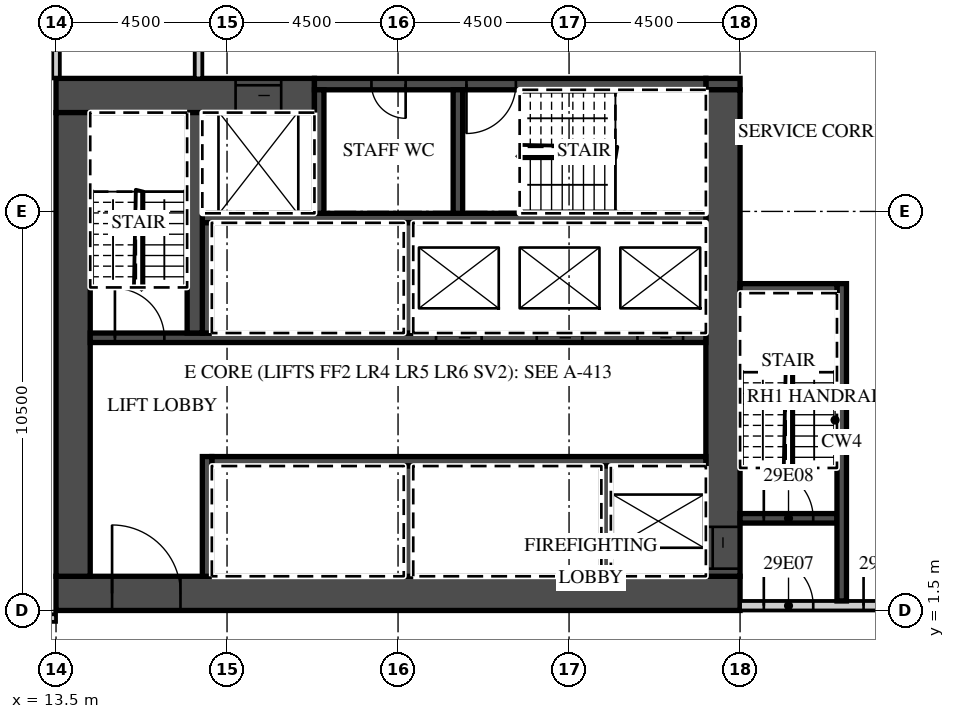
"""IFC4 building model, lengths in metres.
Left out: names, types, materials, properties, quantities, classifications, styles, units other than length and angle.
Written with IfcOpenShell. Run it as: python <this file> out.ifc"""

import sys

from ifc_helpers import new_model, si_unit, direction, frame, frame_2d, origin, place, context, subcontext, project, spatial, rectangle, extrude, element, fill, save


model = new_model("IFC4")
c1 = context("Model", 3, precision=1e-05, world=origin(), true_north=direction((0.0, 1.0)))
c2 = subcontext(c1, "Body", "Model", "MODEL_VIEW")
j1 = project(units=[si_unit("LENGTHUNIT", "METRE"), si_unit("PLANEANGLEUNIT", "RADIAN")], contexts=[c1])
p1 = place(None, origin())
s1 = spatial("IfcSite", under=j1, at=p1, CompositionType="ELEMENT")
p2 = place(p1, origin())
s2 = spatial("IfcBuilding", under=s1, at=p2, CompositionType="ELEMENT")
p3 = place(p2, frame((0.0, 0.0, 130.6)))
s3 = spatial("IfcBuildingStorey", under=s2, at=p3, CompositionType="ELEMENT", Elevation=130.6)
p4 = place(p3, frame((13.5, 15.5, 0.0), z_axis=(0.0, 0.0, 1.0), x_axis=(0.0, 1.0, 0.0)))
e1 = element("IfcWall", 1, at=p4, inside=s3, PredefinedType="PARTITIONING", context=c2, shape_type="SweptSolid", body=[
    extrude(rectangle(XDim=7.162, YDim=0.2, at=frame_2d((3.581, 0.0))), origin(), (0.0, 0.0, 1.0), 3.02),
])
p5 = place(p3, frame((-39.316, 1.3, 0.0), z_axis=(0.0, 0.0, 1.0), x_axis=(1.0, 0.0, 0.0)))
e2 = element("IfcWall", 2, at=p5, inside=s3, PredefinedType="PARTITIONING", context=c2, shape_type="SweptSolid", body=[
    extrude(rectangle(XDim=52.816, YDim=0.2, at=frame_2d((26.408, 0.0))), origin(), (0.0, 0.0, 1.0), 3.02),
])
p6 = place(p5, frame((0.15, 0.0, 0.0)))
e3 = element("IfcOpeningElement", 3, at=p6, cuts=e2, PredefinedType="OPENING", context=c2, shape_type="SweptSolid", body=[
    extrude(rectangle(XDim=0.9, YDim=2.1, at=frame_2d((0.45, 1.05))), frame((0.0, 0.11, 0.0), z_axis=(0.0, -1.0, 0.0), x_axis=(1.0, 0.0, 0.0)), (0.0, 0.0, 1.0), 0.22),
])
p7 = place(p5, frame((8.679, 0.0, 0.0)))
e4 = element("IfcOpeningElement", 4, at=p7, cuts=e2, PredefinedType="OPENING", context=c2, shape_type="SweptSolid", body=[
    extrude(rectangle(XDim=1.2, YDim=2.1, at=frame_2d((0.6, 1.05))), frame((0.0, 0.11, 0.0), z_axis=(0.0, -1.0, 0.0), x_axis=(1.0, 0.0, 0.0)), (0.0, 0.0, 1.0), 0.22),
])
p8 = place(p5, frame((14.754, 0.0, 0.0)))
e5 = element("IfcOpeningElement", 5, at=p8, cuts=e2, PredefinedType="OPENING", context=c2, shape_type="SweptSolid", body=[
    extrude(rectangle(XDim=1.2, YDim=2.1, at=frame_2d((0.6, 1.05))), frame((0.0, 0.11, 0.0), z_axis=(0.0, -1.0, 0.0), x_axis=(1.0, 0.0, 0.0)), (0.0, 0.0, 1.0), 0.22),
])
p9 = place(p5, frame((26.678, 0.0, 0.0)))
e6 = element("IfcOpeningElement", 6, at=p9, cuts=e2, PredefinedType="OPENING", context=c2, shape_type="SweptSolid", body=[
    extrude(rectangle(XDim=1.2, YDim=2.1, at=frame_2d((0.6, 1.05))), frame((0.0, 0.11, 0.0), z_axis=(0.0, -1.0, 0.0), x_axis=(1.0, 0.0, 0.0)), (0.0, 0.0, 1.0), 0.22),
])
p10 = place(p5, frame((33.266, 0.0, 0.0)))
e7 = element("IfcOpeningElement", 7, at=p10, cuts=e2, PredefinedType="OPENING", context=c2, shape_type="SweptSolid", body=[
    extrude(rectangle(XDim=1.0, YDim=2.1, at=frame_2d((0.5, 1.05))), frame((0.0, 0.11, 0.0), z_axis=(0.0, -1.0, 0.0), x_axis=(1.0, 0.0, 0.0)), (0.0, 0.0, 1.0), 0.22),
])
p11 = place(p5, frame((37.741, 0.0, 0.0)))
e8 = element("IfcOpeningElement", 8, at=p11, cuts=e2, PredefinedType="OPENING", context=c2, shape_type="SweptSolid", body=[
    extrude(rectangle(XDim=1.0, YDim=2.1, at=frame_2d((0.5, 1.05))), frame((0.0, 0.11, 0.0), z_axis=(0.0, -1.0, 0.0), x_axis=(1.0, 0.0, 0.0)), (0.0, 0.0, 1.0), 0.22),
])
p12 = place(p5, frame((41.754, 0.0, 0.0)))
e9 = element("IfcOpeningElement", 9, at=p12, cuts=e2, PredefinedType="OPENING", context=c2, shape_type="SweptSolid", body=[
    extrude(rectangle(XDim=1.2, YDim=2.1, at=frame_2d((0.6, 1.05))), frame((0.0, 0.11, 0.0), z_axis=(0.0, -1.0, 0.0), x_axis=(1.0, 0.0, 0.0)), (0.0, 0.0, 1.0), 0.22),
])
p13 = place(p5, frame((51.241, 0.0, 0.0)))
e10 = element("IfcOpeningElement", 10, at=p13, cuts=e2, PredefinedType="OPENING", context=c2, shape_type="SweptSolid", body=[
    extrude(rectangle(XDim=1.0, YDim=2.1, at=frame_2d((0.5, 1.05))), frame((0.0, 0.11, 0.0), z_axis=(0.0, -1.0, 0.0), x_axis=(1.0, 0.0, 0.0)), (0.0, 0.0, 1.0), 0.22),
])
p14 = place(p3, frame((13.5, 1.95, 0.0), z_axis=(0.0, 0.0, 1.0), x_axis=(1.0, 0.0, 0.0)))
e11 = element("IfcWall", 11, at=p14, inside=s3, PredefinedType="SHEAR", context=c2, shape_type="SweptSolid", body=[
    extrude(rectangle(XDim=18.0, YDim=0.9, at=frame_2d((9.0, 0.0))), origin(), (0.0, 0.0, 1.0), 3.02),
])
p15 = place(p14, frame((1.475, 0.0, 0.0)))
e12 = element("IfcOpeningElement", 12, at=p15, cuts=e11, PredefinedType="OPENING", context=c2, shape_type="SweptSolid", body=[
    extrude(rectangle(XDim=1.8, YDim=2.1, at=frame_2d((0.9, 1.05))), frame((0.0, 0.46, 0.0), z_axis=(0.0, -1.0, 0.0), x_axis=(1.0, 0.0, 0.0)), (0.0, 0.0, 1.0), 0.92),
])
p16 = place(p3, frame((13.5, 15.05, 0.0), z_axis=(0.0, 0.0, 1.0), x_axis=(1.0, 0.0, 0.0)))
e13 = element("IfcWall", 13, at=p16, inside=s3, PredefinedType="SHEAR", context=c2, shape_type="SweptSolid", body=[
    extrude(rectangle(XDim=6.8, YDim=0.9, at=frame_2d((3.4, 0.0))), origin(), (0.0, 0.0, 1.0), 3.02),
])
p17 = place(p16, frame((4.725, 0.0, 0.0)))
e14 = element("IfcOpeningElement", 14, at=p17, cuts=e13, PredefinedType="OPENING", context=c2, shape_type="SweptSolid", body=[
    extrude(rectangle(XDim=1.2, YDim=2.1, at=frame_2d((0.6, 1.05))), frame((0.0, 0.46, 0.0), z_axis=(0.0, -1.0, 0.0), x_axis=(1.0, 0.0, 0.0)), (0.0, 0.0, 1.0), 0.92),
])
p18 = place(p3, frame((30.6, 15.35, 0.0), z_axis=(0.0, 0.0, 1.0), x_axis=(1.0, 0.0, 0.0)))
e15 = element("IfcWall", 15, at=p18, inside=s3, PredefinedType="SHEAR", context=c2, shape_type="SweptSolid", body=[
    extrude(rectangle(XDim=0.9, YDim=0.3, at=frame_2d((0.45, 0.0))), origin(), (0.0, 0.0, 1.0), 3.02),
])
p19 = place(p3, frame((20.3, 15.35, 0.0), z_axis=(0.0, 0.0, 1.0), x_axis=(1.0, 0.0, 0.0)))
e16 = element("IfcWall", 16, at=p19, inside=s3, PredefinedType="SHEAR", context=c2, shape_type="SweptSolid", body=[
    extrude(rectangle(XDim=10.3, YDim=0.3, at=frame_2d((5.15, 0.0))), origin(), (0.0, 0.0, 1.0), 3.02),
])
p20 = place(p19, frame((4.0, 0.0, 0.0)))
e17 = element("IfcOpeningElement", 17, at=p20, cuts=e16, PredefinedType="OPENING", context=c2, shape_type="SweptSolid", body=[
    extrude(rectangle(XDim=1.3, YDim=2.1, at=frame_2d((0.65, 1.05))), frame((0.0, 0.16, 0.0), z_axis=(0.0, -1.0, 0.0), x_axis=(1.0, 0.0, 0.0)), (0.0, 0.0, 1.0), 0.32),
])
p21 = place(p19, frame((1.5, 0.0, 0.0)))
e18 = element("IfcOpeningElement", 18, at=p21, cuts=e16, PredefinedType="OPENING", context=c2, shape_type="SweptSolid", body=[
    extrude(rectangle(XDim=0.9, YDim=2.1, at=frame_2d((0.45, 1.05))), frame((0.0, 0.16, 0.0), z_axis=(0.0, -1.0, 0.0), x_axis=(1.0, 0.0, 0.0)), (0.0, 0.0, 1.0), 0.32),
])
p22 = place(p3, frame((31.05, 2.4, 0.0), z_axis=(0.0, 0.0, 1.0), x_axis=(0.0, 1.0, 0.0)))
e19 = element("IfcWall", 19, at=p22, inside=s3, PredefinedType="SHEAR", context=c2, shape_type="SweptSolid", body=[
    extrude(rectangle(XDim=12.8, YDim=0.9, at=frame_2d((6.4, 0.0))), origin(), (0.0, 0.0, 1.0), 3.02),
])
p23 = place(p22, frame((0.2, 0.0, 0.0)))
e20 = element("IfcOpeningElement", 20, at=p23, cuts=e19, PredefinedType="OPENING", context=c2, shape_type="SweptSolid", body=[
    extrude(rectangle(XDim=1.1, YDim=2.1, at=frame_2d((0.55, 1.05))), frame((0.0, 0.46, 0.0), z_axis=(0.0, -1.0, 0.0), x_axis=(1.0, 0.0, 0.0)), (0.0, 0.0, 1.0), 0.92),
])
p24 = place(p3, frame((13.95, 2.4, 0.0), z_axis=(0.0, 0.0, 1.0), x_axis=(0.0, 1.0, 0.0)))
e21 = element("IfcWall", 21, at=p24, inside=s3, PredefinedType="SHEAR", context=c2, shape_type="SweptSolid", body=[
    extrude(rectangle(XDim=12.2, YDim=0.9, at=frame_2d((6.1, 0.0))), origin(), (0.0, 0.0, 1.0), 3.02),
])
p25 = place(p3, frame((17.6, 5.425, 0.0), z_axis=(0.0, 0.0, 1.0), x_axis=(1.0, 0.0, 0.0)))
e22 = element("IfcWall", 22, at=p25, inside=s3, PredefinedType="SHEAR", context=c2, shape_type="SweptSolid", body=[
    extrude(rectangle(XDim=13.0, YDim=0.25, at=frame_2d((6.5, 0.0))), origin(), (0.0, 0.0, 1.0), 3.02),
])
p26 = place(p3, frame((17.475, 2.4, 0.0), z_axis=(0.0, 0.0, 1.0), x_axis=(0.0, 1.0, 0.0)))
e23 = element("IfcWall", 23, at=p26, inside=s3, PredefinedType="SHEAR", context=c2, shape_type="SweptSolid", body=[
    extrude(rectangle(XDim=3.15, YDim=0.25, at=frame_2d((1.575, 0.0))), origin(), (0.0, 0.0, 1.0), 3.02),
])
for number, where, z_axis, x_axis in (
    (24, (27.975, 2.4, 0.0), (0.0, 0.0, 1.0), (0.0, 1.0, 0.0)),
    (25, (22.775, 2.4, 0.0), (0.0, 0.0, 1.0), (0.0, 1.0, 0.0)),
):
    element("IfcWall", number, at=place(p3, frame(where, z_axis=z_axis, x_axis=x_axis)), inside=s3, PredefinedType="SHEAR", context=c2, shape_type="SweptSolid", body=[
        extrude(rectangle(XDim=2.9, YDim=0.25, at=frame_2d((1.45, 0.0))), origin(), (0.0, 0.0, 1.0), 3.02),
    ])
p27 = place(p3, frame((14.4, 8.675, 0.0), z_axis=(0.0, 0.0, 1.0), x_axis=(1.0, 0.0, 0.0)))
e26 = element("IfcWall", 26, at=p27, inside=s3, PredefinedType="SHEAR", context=c2, shape_type="SweptSolid", body=[
    extrude(rectangle(XDim=16.2, YDim=0.25, at=frame_2d((8.1, 0.0))), origin(), (0.0, 0.0, 1.0), 3.02),
])
p28 = place(p27, frame((14.4, 0.0, 0.0)))
e27 = element("IfcOpeningElement", 27, at=p28, cuts=e26, PredefinedType="OPENING", context=c2, shape_type="SweptSolid", body=[
    extrude(rectangle(XDim=1.2, YDim=2.1, at=frame_2d((0.6, 1.05))), frame((0.0, 0.135, 0.0), z_axis=(0.0, -1.0, 0.0), x_axis=(1.0, 0.0, 0.0)), (0.0, 0.0, 1.0), 0.27),
])
p29 = place(p27, frame((11.75, 0.0, 0.0)))
e28 = element("IfcOpeningElement", 28, at=p29, cuts=e26, PredefinedType="OPENING", context=c2, shape_type="SweptSolid", body=[
    extrude(rectangle(XDim=1.2, YDim=2.1, at=frame_2d((0.6, 1.05))), frame((0.0, 0.135, 0.0), z_axis=(0.0, -1.0, 0.0), x_axis=(1.0, 0.0, 0.0)), (0.0, 0.0, 1.0), 0.27),
])
p30 = place(p27, frame((9.1, 0.0, 0.0)))
e29 = element("IfcOpeningElement", 29, at=p30, cuts=e26, PredefinedType="OPENING", context=c2, shape_type="SweptSolid", body=[
    extrude(rectangle(XDim=1.2, YDim=2.1, at=frame_2d((0.6, 1.05))), frame((0.0, 0.135, 0.0), z_axis=(0.0, -1.0, 0.0), x_axis=(1.0, 0.0, 0.0)), (0.0, 0.0, 1.0), 0.27),
])
p31 = place(p27, frame((0.65, 0.0, 0.0)))
e30 = element("IfcOpeningElement", 30, at=p31, cuts=e26, PredefinedType="OPENING", context=c2, shape_type="SweptSolid", body=[
    extrude(rectangle(XDim=1.3, YDim=2.1, at=frame_2d((0.65, 1.05))), frame((0.0, 0.135, 0.0), z_axis=(0.0, -1.0, 0.0), x_axis=(1.0, 0.0, 0.0)), (0.0, 0.0, 1.0), 0.27),
])
p32 = place(p3, frame((17.35, 11.825, 0.0), z_axis=(0.0, 0.0, 1.0), x_axis=(1.0, 0.0, 0.0)))
e31 = element("IfcWall", 31, at=p32, inside=s3, PredefinedType="SHEAR", context=c2, shape_type="SweptSolid", body=[
    extrude(rectangle(XDim=13.25, YDim=0.25, at=frame_2d((6.625, 0.0))), origin(), (0.0, 0.0, 1.0), 3.02),
])
for number, where, z_axis, x_axis in (
    (32, (17.475, 8.8, 0.0), (0.0, 0.0, 1.0), (0.0, 1.0, 0.0)),
    (33, (22.775, 8.8, 0.0), (0.0, 0.0, 1.0), (0.0, 1.0, 0.0)),
):
    element("IfcWall", number, at=place(p3, frame(where, z_axis=z_axis, x_axis=x_axis)), inside=s3, PredefinedType="SHEAR", context=c2, shape_type="SweptSolid", body=[
        extrude(rectangle(XDim=2.9, YDim=0.25, at=frame_2d((1.45, 0.0))), origin(), (0.0, 0.0, 1.0), 3.02),
    ])
p33 = place(p3, frame((17.15, 8.8, 0.0), z_axis=(0.0, 0.0, 1.0), x_axis=(0.0, 1.0, 0.0)))
e34 = element("IfcWall", 34, at=p33, inside=s3, PredefinedType="SHEAR", context=c2, shape_type="SweptSolid", body=[
    extrude(rectangle(XDim=5.8, YDim=0.4, at=frame_2d((2.9, 0.0))), origin(), (0.0, 0.0, 1.0), 3.02),
])
for number, where, z_axis, x_axis in (
    (35, (20.425, 11.95, 0.0), (0.0, 0.0, 1.0), (0.0, 1.0, 0.0)),
    (36, (24.075, 11.95, 0.0), (0.0, 0.0, 1.0), (0.0, 1.0, 0.0)),
):
    element("IfcWall", number, at=place(p3, frame(where, z_axis=z_axis, x_axis=x_axis)), inside=s3, PredefinedType="SHEAR", context=c2, shape_type="SweptSolid", body=[
        extrude(rectangle(XDim=3.25, YDim=0.25, at=frame_2d((1.625, 0.0))), origin(), (0.0, 0.0, 1.0), 3.02),
    ])
p34 = place(p3, frame((31.5, 1.625, 0.0), z_axis=(0.0, 0.0, 1.0), x_axis=(1.0, 0.0, 0.0)))
e37 = element("IfcWall", 37, at=p34, inside=s3, PredefinedType="PARTITIONING", context=c2, shape_type="SweptSolid", body=[
    extrude(rectangle(XDim=15.65, YDim=0.25, at=frame_2d((7.825, 0.0))), origin(), (0.0, 0.0, 1.0), 3.02),
])
p35 = place(p34, frame((0.625, 0.0, 0.0)))
e38 = element("IfcOpeningElement", 38, at=p35, cuts=e37, PredefinedType="OPENING", context=c2, shape_type="SweptSolid", body=[
    extrude(rectangle(XDim=1.3, YDim=2.1, at=frame_2d((0.65, 1.05))), frame((0.0, 0.135, 0.0), z_axis=(0.0, -1.0, 0.0), x_axis=(1.0, 0.0, 0.0)), (0.0, 0.0, 1.0), 0.27),
])
p36 = place(p34, frame((3.25, 0.0, 0.0)))
e39 = element("IfcOpeningElement", 39, at=p36, cuts=e37, PredefinedType="OPENING", context=c2, shape_type="SweptSolid", body=[
    extrude(rectangle(XDim=1.1, YDim=2.1, at=frame_2d((0.55, 1.05))), frame((0.0, 0.135, 0.0), z_axis=(0.0, -1.0, 0.0), x_axis=(1.0, 0.0, 0.0)), (0.0, 0.0, 1.0), 0.27),
])
p37 = place(p3, frame((31.5, 3.925, 0.0), z_axis=(0.0, 0.0, 1.0), x_axis=(1.0, 0.0, 0.0)))
e40 = element("IfcWall", 40, at=p37, inside=s3, PredefinedType="SHEAR", context=c2, shape_type="SweptSolid", body=[
    extrude(rectangle(XDim=2.55, YDim=0.25, at=frame_2d((1.275, 0.0))), origin(), (0.0, 0.0, 1.0), 3.02),
])
p38 = place(p37, frame((0.625, 0.0, 0.0)))
e41 = element("IfcOpeningElement", 41, at=p38, cuts=e40, PredefinedType="OPENING", context=c2, shape_type="SweptSolid", body=[
    extrude(rectangle(XDim=1.3, YDim=2.1, at=frame_2d((0.65, 1.05))), frame((0.0, 0.135, 0.0), z_axis=(0.0, -1.0, 0.0), x_axis=(1.0, 0.0, 0.0)), (0.0, 0.0, 1.0), 0.27),
])
p39 = place(p3, frame((34.175, 1.75, 0.0), z_axis=(0.0, 0.0, 1.0), x_axis=(0.0, 1.0, 0.0)))
e42 = element("IfcWall", 42, at=p39, inside=s3, PredefinedType="SHEAR", context=c2, shape_type="SweptSolid", body=[
    extrude(rectangle(XDim=8.35, YDim=0.25, at=frame_2d((4.175, 0.0))), origin(), (0.0, 0.0, 1.0), 3.02),
])
p40 = place(p3, frame((31.5, 9.975, 0.0), z_axis=(0.0, 0.0, 1.0), x_axis=(1.0, 0.0, 0.0)))
e43 = element("IfcWall", 43, at=p40, inside=s3, PredefinedType="SHEAR", context=c2, shape_type="SweptSolid", body=[
    extrude(rectangle(XDim=2.55, YDim=0.25, at=frame_2d((1.275, 0.0))), origin(), (0.0, 0.0, 1.0), 3.02),
])
p41 = place(p3, frame((17.25, 15.5, 0.0), z_axis=(0.0, 0.0, 1.0), x_axis=(0.0, 1.0, 0.0)))
e44 = element("IfcWall", 44, at=p41, inside=s3, PredefinedType="PARTITIONING", context=c2, shape_type="SweptSolid", body=[
    extrude(rectangle(XDim=2.2, YDim=0.2, at=frame_2d((1.1, 0.0))), origin(), (0.0, 0.0, 1.0), 3.02),
])
p42 = place(p28, origin())
e45 = element("IfcDoor", 45, at=p42, inside=s3, OperationType="SLIDING_TO_LEFT", PredefinedType="DOOR", context=c2, shape_type="SweptSolid", body=[
    extrude(rectangle(XDim=1.2, YDim=2.1, at=frame_2d((0.6, 1.05))), frame((0.0, 0.025, 0.0), z_axis=(0.0, -1.0, 0.0), x_axis=(1.0, 0.0, 0.0)), (0.0, 0.0, 1.0), 0.05),
])
fill(e27, e45)
p43 = place(p29, origin())
e46 = element("IfcDoor", 46, at=p43, inside=s3, OperationType="SLIDING_TO_RIGHT", PredefinedType="DOOR", context=c2, shape_type="SweptSolid", body=[
    extrude(rectangle(XDim=1.2, YDim=2.1, at=frame_2d((0.6, 1.05))), frame((0.0, 0.025, 0.0), z_axis=(0.0, -1.0, 0.0), x_axis=(1.0, 0.0, 0.0)), (0.0, 0.0, 1.0), 0.05),
])
fill(e28, e46)
p44 = place(p30, origin())
e47 = element("IfcDoor", 47, at=p44, inside=s3, OperationType="SLIDING_TO_RIGHT", PredefinedType="DOOR", context=c2, shape_type="SweptSolid", body=[
    extrude(rectangle(XDim=1.2, YDim=2.1, at=frame_2d((0.6, 1.05))), frame((0.0, 0.025, 0.0), z_axis=(0.0, -1.0, 0.0), x_axis=(1.0, 0.0, 0.0)), (0.0, 0.0, 1.0), 0.05),
])
fill(e29, e47)
p45 = place(p17, origin())
e48 = element("IfcDoor", 48, at=p45, inside=s3, OperationType="SLIDING_TO_LEFT", PredefinedType="DOOR", context=c2, shape_type="SweptSolid", body=[
    extrude(rectangle(XDim=1.2, YDim=2.1, at=frame_2d((0.6, 1.05))), frame((0.0, 0.025, 0.0), z_axis=(0.0, -1.0, 0.0), x_axis=(1.0, 0.0, 0.0)), (0.0, 0.0, 1.0), 0.05),
])
fill(e14, e48)
p46 = place(p23, origin())
e49 = element("IfcDoor", 49, at=p46, inside=s3, OperationType="SLIDING_TO_LEFT", PredefinedType="DOOR", context=c2, shape_type="SweptSolid", body=[
    extrude(rectangle(XDim=1.1, YDim=2.1, at=frame_2d((0.55, 1.05))), frame((0.0, 0.025, 0.0), z_axis=(0.0, -1.0, 0.0), x_axis=(1.0, 0.0, 0.0)), (0.0, 0.0, 1.0), 0.05),
])
fill(e20, e49)
p47 = place(p15, origin())
e50 = element("IfcDoor", 50, at=p47, inside=s3, OperationType="DOUBLE_DOOR_DOUBLE_SWING", PredefinedType="DOOR", context=c2, shape_type="SweptSolid", body=[
    extrude(rectangle(XDim=1.8, YDim=2.1, at=frame_2d((0.9, 1.05))), frame((0.0, 0.025, 0.0), z_axis=(0.0, -1.0, 0.0), x_axis=(1.0, 0.0, 0.0)), (0.0, 0.0, 1.0), 0.05),
])
fill(e12, e50)
p48 = place(p35, origin())
e51 = element("IfcDoor", 51, at=p48, inside=s3, OperationType="SINGLE_SWING_LEFT", PredefinedType="DOOR", context=c2, shape_type="SweptSolid", body=[
    extrude(rectangle(XDim=1.3, YDim=2.1, at=frame_2d((0.65, 1.05))), frame((0.0, 0.025, 0.0), z_axis=(0.0, -1.0, 0.0), x_axis=(1.0, 0.0, 0.0)), (0.0, 0.0, 1.0), 0.05),
])
fill(e38, e51)
p49 = place(p38, origin())
e52 = element("IfcDoor", 52, at=p49, inside=s3, OperationType="SINGLE_SWING_LEFT", PredefinedType="DOOR", context=c2, shape_type="SweptSolid", body=[
    extrude(rectangle(XDim=1.3, YDim=2.1, at=frame_2d((0.65, 1.05))), frame((0.0, 0.025, 0.0), z_axis=(0.0, -1.0, 0.0), x_axis=(1.0, 0.0, 0.0)), (0.0, 0.0, 1.0), 0.05),
])
fill(e41, e52)
p50 = place(p36, origin())
e53 = element("IfcDoor", 53, at=p50, inside=s3, OperationType="SINGLE_SWING_LEFT", PredefinedType="DOOR", context=c2, shape_type="SweptSolid", body=[
    extrude(rectangle(XDim=1.1, YDim=2.1, at=frame_2d((0.55, 1.05))), frame((0.0, 0.025, 0.0), z_axis=(0.0, -1.0, 0.0), x_axis=(1.0, 0.0, 0.0)), (0.0, 0.0, 1.0), 0.05),
])
fill(e39, e53)
p51 = place(p31, origin())
e54 = element("IfcDoor", 54, at=p51, inside=s3, OperationType="SINGLE_SWING_LEFT", PredefinedType="DOOR", context=c2, shape_type="SweptSolid", body=[
    extrude(rectangle(XDim=1.3, YDim=2.1, at=frame_2d((0.65, 1.05))), frame((0.0, 0.025, 0.0), z_axis=(0.0, -1.0, 0.0), x_axis=(1.0, 0.0, 0.0)), (0.0, 0.0, 1.0), 0.05),
])
fill(e30, e54)
p52 = place(p20, origin())
e55 = element("IfcDoor", 55, at=p52, inside=s3, OperationType="SINGLE_SWING_LEFT", PredefinedType="DOOR", context=c2, shape_type="SweptSolid", body=[
    extrude(rectangle(XDim=1.3, YDim=2.1, at=frame_2d((0.65, 1.05))), frame((0.0, 0.025, 0.0), z_axis=(0.0, -1.0, 0.0), x_axis=(1.0, 0.0, 0.0)), (0.0, 0.0, 1.0), 0.05),
])
fill(e17, e55)
p53 = place(p21, origin())
e56 = element("IfcDoor", 56, at=p53, inside=s3, OperationType="SINGLE_SWING_RIGHT", PredefinedType="DOOR", context=c2, shape_type="SweptSolid", body=[
    extrude(rectangle(XDim=0.9, YDim=2.1, at=frame_2d((0.45, 1.05))), frame((0.0, 0.025, 0.0), z_axis=(0.0, -1.0, 0.0), x_axis=(1.0, 0.0, 0.0)), (0.0, 0.0, 1.0), 0.05),
])
fill(e18, e56)
save(model, sys.argv[1])
